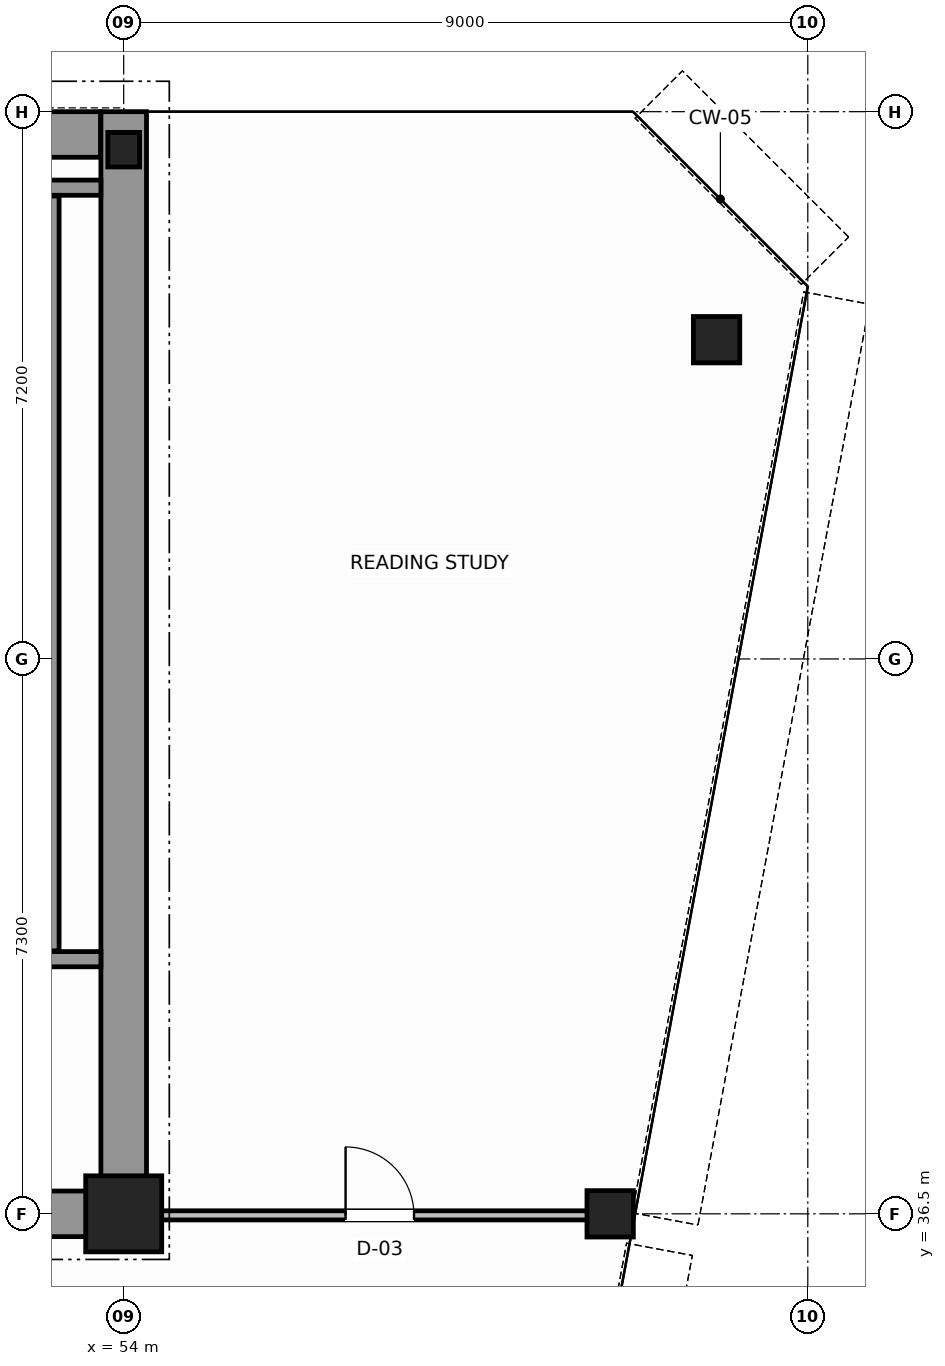
"""IFC4 building model, lengths in metres.
Left out: names, types, materials, properties, quantities, classifications, styles, units other than length and angle.
Written with IfcOpenShell. Run it as: python <this file> out.ifc"""

import sys

from ifc_helpers import new_model, si_unit, direction, frame, frame_2d, origin, origin_2d, place, context, subcontext, project, spatial, rectangle, hollow_circle, i_section, extrude, source, transform, mapped, element, fill, save


model = new_model("IFC4")
c1 = context("Model", 3, precision=1e-05, world=origin(), true_north=direction((0.0, 1.0)))
c2 = subcontext(c1, "Body", "Model", "MODEL_VIEW")
j1 = project(units=[si_unit("LENGTHUNIT", "METRE"), si_unit("PLANEANGLEUNIT", "RADIAN")], contexts=[c1])
p1 = place(None, origin())
s1 = spatial("IfcSite", under=j1, at=p1, CompositionType="ELEMENT")
p2 = place(p1, origin())
s2 = spatial("IfcBuilding", under=s1, at=p2, CompositionType="ELEMENT")
p3 = place(p2, frame((0.0, 0.0, 238.4)))
s3 = spatial("IfcBuildingStorey", under=s2, at=p3, CompositionType="ELEMENT", Elevation=238.4)
m1 = source(origin(), c2, "Body", "SweptSolid", [
    extrude(rectangle(XDim=1.0, YDim=1.0, at=origin_2d()), origin(), (0.0, 0.0, 1.0), 3.8),
])
p4 = place(p3, frame((54.0, 36.5, 0.0), z_axis=(0.0, 0.0, 1.0), x_axis=(1.0, 0.0, 0.0)))
e1 = element("IfcColumn", 1, at=p4, inside=s3, PredefinedType="COLUMN", context=c2, shape_type="MappedRepresentation", body=[
    mapped(m1, transform((0.0, 0.0, 0.0), scale=1.0)),
])
m2 = source(origin(), c2, "Body", "SweptSolid", [
    extrude(i_section(OverallWidth=0.418, OverallDepth=0.455, WebThickness=0.042, FlangeThickness=0.058, FilletRadius=0.015, at=origin_2d()), origin(), (0.0, 0.0, 1.0), 3.8),
])
p5 = place(p3, frame((54.0, 50.5, 0.0), z_axis=(0.0, 0.0, 1.0), x_axis=(1.0, 0.0, 0.0)))
e2 = element("IfcColumn", 2, at=p5, inside=s3, PredefinedType="COLUMN", context=c2, shape_type="MappedRepresentation", body=[
    mapped(m2, transform((0.0, 0.0, 0.0), scale=1.0)),
])
m3 = source(origin(), c2, "Body", "SweptSolid", [
    extrude(hollow_circle(Radius=0.305, WallThickness=0.03, at=origin_2d()), origin(), (0.0, 0.0, 1.0), 3.8),
])
for number, where, z_axis, x_axis in (
    (3, (61.8, 48.0, 0.0), (0.0, 0.0, 1.0), (1.0, 0.0, 0.0)),
    (4, (60.4, 36.5, 0.0), (0.0, 0.0, 1.0), (1.0, 0.0, 0.0)),
):
    element("IfcColumn", number, at=place(p3, frame(where, z_axis=z_axis, x_axis=x_axis)), inside=s3, PredefinedType="COLUMN", context=c2, shape_type="MappedRepresentation", body=[
        mapped(m3, transform((0.0, 0.0, 0.0), scale=1.0)),
    ])
p6 = place(p3, frame((34.002, 50.7, 0.0), z_axis=(0.0, 0.0, 1.0), x_axis=(1.0, 0.0, 0.0)))
e5 = element("IfcWall", 5, at=p6, inside=s3, PredefinedType="SHEAR", context=c2, shape_type="SweptSolid", body=[
    extrude(rectangle(XDim=19.694, YDim=0.6, at=frame_2d((9.847, 0.0))), origin(), (0.0, 0.0, 1.0), 3.8),
])
p7 = place(p3, frame((54.0, 36.5, 0.0), z_axis=(0.0, 0.0, 1.0), x_axis=(0.0, 1.0, 0.0)))
e6 = element("IfcWall", 6, at=p7, inside=s3, PredefinedType="SHEAR", context=c2, shape_type="SweptSolid", body=[
    extrude(rectangle(XDim=14.5, YDim=0.6, at=frame_2d((7.25, 0.0))), origin(), (0.0, 0.0, 1.0), 3.8),
])
p8 = place(p3, frame((49.8, 36.5, 0.0), z_axis=(0.0, 0.0, 1.0), x_axis=(1.0, 0.0, 0.0)))
e7 = element("IfcWall", 7, at=p8, inside=s3, PredefinedType="SHEAR", context=c2, shape_type="SweptSolid", body=[
    extrude(rectangle(XDim=3.88, YDim=0.6, at=frame_2d((1.94, 0.0))), origin(), (0.0, 0.0, 1.0), 2.58),
])
p9 = place(p3, frame((49.4, 39.85, 0.0), z_axis=(0.0, 0.0, 1.0), x_axis=(1.0, 0.0, 0.0)))
e8 = element("IfcWall", 8, at=p9, inside=s3, PredefinedType="SOLIDWALL", context=c2, shape_type="SweptSolid", body=[
    extrude(rectangle(XDim=4.3, YDim=0.2, at=frame_2d((2.15, 0.0))), origin(), (0.0, 0.0, 1.0), 3.8),
])
p10 = place(p9, frame((1.325, 0.0, 0.0)))
e9 = element("IfcOpeningElement", 9, at=p10, cuts=e8, PredefinedType="OPENING", context=c2, shape_type="SweptSolid", body=[
    extrude(rectangle(XDim=1.1, YDim=2.15, at=frame_2d((0.55, 1.075))), frame((0.0, 0.11, 0.0), z_axis=(0.0, -1.0, 0.0), x_axis=(1.0, 0.0, 0.0)), (0.0, 0.0, 1.0), 0.22),
])
p11 = place(p3, frame((49.4, 50.0, 0.0), z_axis=(0.0, 0.0, 1.0), x_axis=(1.0, 0.0, 0.0)))
e10 = element("IfcWall", 10, at=p11, inside=s3, PredefinedType="SOLIDWALL", context=c2, shape_type="SweptSolid", body=[
    extrude(rectangle(XDim=4.3, YDim=0.2, at=frame_2d((2.15, 0.0))), origin(), (0.0, 0.0, 1.0), 3.8),
])
p12 = place(p3, frame((53.05, 39.96, 0.0), z_axis=(0.0, 0.0, 1.0), x_axis=(0.0, 1.0, 0.0)))
e11 = element("IfcWall", 11, at=p12, inside=s3, PredefinedType="SOLIDWALL", context=c2, shape_type="SweptSolid", body=[
    extrude(rectangle(XDim=9.93, YDim=0.2, at=frame_2d((4.965, 0.0))), origin(), (0.0, 0.0, 1.0), 3.8),
])
p13 = place(p3, frame((54.06, 36.48, 0.0), z_axis=(0.0, 0.0, 1.0), x_axis=(1.0, 0.0, 0.0)))
e12 = element("IfcWall", 12, at=p13, inside=s3, PredefinedType="PARTITIONING", context=c2, shape_type="SweptSolid", body=[
    extrude(rectangle(XDim=6.619, YDim=0.12, at=frame_2d((3.31, 0.0))), origin(), (0.0, 0.0, 1.0), 3.02),
])
p14 = place(p13, frame((2.859, 0.0, 0.0)))
e13 = element("IfcOpeningElement", 13, at=p14, cuts=e12, PredefinedType="OPENING", context=c2, shape_type="SweptSolid", body=[
    extrude(rectangle(XDim=0.9, YDim=2.15, at=frame_2d((0.45, 1.075))), frame((0.0, 0.07, 0.0), z_axis=(0.0, -1.0, 0.0), x_axis=(1.0, 0.0, 0.0)), (0.0, 0.0, 1.0), 0.14),
])
m4 = source(origin(), c2, "Body", "SweptSolid", [
    extrude(rectangle(XDim=0.9, YDim=2.15, at=frame_2d((0.45, 1.075))), frame((0.0, 0.025, 0.0), z_axis=(0.0, -1.0, 0.0), x_axis=(1.0, 0.0, 0.0)), (0.0, 0.0, 1.0), 0.05),
])
p15 = place(p14, origin())
e14 = element("IfcDoor", 14, at=p15, inside=s3, OperationType="SINGLE_SWING_RIGHT", PredefinedType="DOOR", context=c2, shape_type="MappedRepresentation", body=[
    mapped(m4, transform((0.0, 0.0, 0.0), scale=1.0)),
])
fill(e13, e14)
save(model, sys.argv[1])
